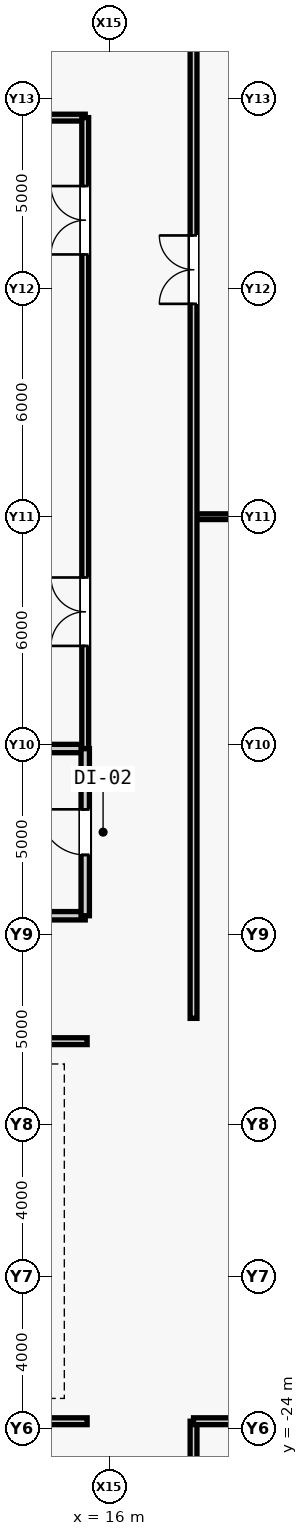
"""IFC4 building model, lengths in metres.
Left out: names, types, materials, properties, quantities, classifications, styles, units other than length and angle.
Written with IfcOpenShell. Run it as: python <this file> out.ifc"""

import sys

from ifc_helpers import new_model, si_unit, direction, frame, frame_2d, origin, place, context, subcontext, project, spatial, rectangle, extrude, source, transform, mapped, element, fill, save


model = new_model("IFC4")
c1 = context("Model", 3, precision=1e-05, world=origin(), true_north=direction((0.0, 1.0)))
c2 = subcontext(c1, "Body", "Model", "MODEL_VIEW")
j1 = project(units=[si_unit("LENGTHUNIT", "METRE"), si_unit("PLANEANGLEUNIT", "RADIAN")], contexts=[c1])
p1 = place(None, origin())
s1 = spatial("IfcSite", under=j1, at=p1, CompositionType="ELEMENT")
p2 = place(p1, origin())
s2 = spatial("IfcBuilding", under=s1, at=p2, CompositionType="ELEMENT")
p3 = place(p2, origin())
s3 = spatial("IfcBuildingStorey", under=s2, at=p3, CompositionType="ELEMENT", Elevation=0.0)
m1 = source(origin(), c2, "Body", "SweptSolid", [
    extrude(rectangle(XDim=4.05, YDim=0.22, at=frame_2d((2.025, 0.0))), origin(), (0.0, 0.0, 1.0), 6.28),
])
for number, where, z_axis, x_axis in (
    (1, (11.3, -10.5, 0.0), (0.0, 0.0, 1.0), (1.0, 0.0, 0.0)),
    (2, (11.3, -6.1, 0.0), (0.0, 0.0, 1.0), (1.0, 0.0, 0.0)),
):
    element("IfcWall", number, at=place(p3, frame(where, z_axis=z_axis, x_axis=x_axis)), inside=s3, PredefinedType="PARTITIONING", context=c2, shape_type="MappedRepresentation", body=[
        mapped(m1, transform((0.0, 0.0, 0.0), scale=1.0)),
    ])
m2 = source(origin(), c2, "Body", "SweptSolid", [
    extrude(rectangle(XDim=4.4, YDim=0.22, at=frame_2d((2.2, 0.0))), origin(), (0.0, 0.0, 1.0), 6.28),
])
p4 = place(p3, frame((15.35, -10.5, 0.0), z_axis=(0.0, 0.0, 1.0), x_axis=(0.0, 1.0, 0.0)))
e3 = element("IfcWall", 3, at=p4, inside=s3, PredefinedType="PARTITIONING", context=c2, shape_type="MappedRepresentation", body=[
    mapped(m2, transform((0.0, 0.0, 0.0), scale=1.0)),
])
m3 = source(origin(), c2, "Body", "SweptSolid", [
    extrude(rectangle(XDim=1.2, YDim=2.2, at=frame_2d((0.6, 1.1))), frame((0.0, 0.12, 0.0), z_axis=(0.0, -1.0, 0.0), x_axis=(1.0, 0.0, 0.0)), (0.0, 0.0, 1.0), 0.24),
])
p5 = place(p4, frame((1.6, 0.0, 0.0)))
e4 = element("IfcOpeningElement", 4, at=p5, cuts=e3, PredefinedType="OPENING", context=c2, shape_type="MappedRepresentation", body=[
    mapped(m3, transform((0.0, 0.0, 0.0), scale=1.0)),
])
m4 = source(origin(), c2, "Body", "SweptSolid", [
    extrude(rectangle(XDim=4.05, YDim=0.18, at=frame_2d((2.025, 0.0))), origin(), (0.0, 0.0, 1.0), 6.28),
])
p6 = place(p3, frame((11.3, 10.5, 0.0), z_axis=(0.0, 0.0, 1.0), x_axis=(1.0, 0.0, 0.0)))
e5 = element("IfcWall", 5, at=p6, inside=s3, PredefinedType="PARTITIONING", context=c2, shape_type="MappedRepresentation", body=[
    mapped(m4, transform((0.0, 0.0, 0.0), scale=1.0)),
])
m5 = source(origin(), c2, "Body", "SweptSolid", [
    extrude(rectangle(XDim=16.6, YDim=0.18, at=frame_2d((8.3, 0.0))), origin(), (0.0, 0.0, 1.0), 6.28),
])
p7 = place(p3, frame((15.35, -6.1, 0.0), z_axis=(0.0, 0.0, 1.0), x_axis=(0.0, 1.0, 0.0)))
e6 = element("IfcWall", 6, at=p7, inside=s3, PredefinedType="PARTITIONING", context=c2, shape_type="MappedRepresentation", body=[
    mapped(m5, transform((0.0, 0.0, 0.0), scale=1.0)),
])
m6 = source(origin(), c2, "Body", "SweptSolid", [
    extrude(rectangle(XDim=1.8, YDim=2.25, at=frame_2d((0.9, 1.125))), frame((0.0, 0.1, 0.0), z_axis=(0.0, -1.0, 0.0), x_axis=(1.0, 0.0, 0.0)), (0.0, 0.0, 1.0), 0.2),
])
p8 = place(p7, frame((2.7, 0.0, 0.0)))
e7 = element("IfcOpeningElement", 7, at=p8, cuts=e6, PredefinedType="OPENING", context=c2, shape_type="MappedRepresentation", body=[
    mapped(m6, transform((0.0, 0.0, 0.0), scale=1.0)),
])
p9 = place(p7, frame((13.0, 0.0, 0.0)))
e8 = element("IfcOpeningElement", 8, at=p9, cuts=e6, PredefinedType="OPENING", context=c2, shape_type="MappedRepresentation", body=[
    mapped(m6, transform((0.0, 0.0, 0.0), scale=1.0)),
])
m7 = source(origin(), c2, "Body", "SweptSolid", [
    extrude(rectangle(XDim=30.8, YDim=0.18, at=frame_2d((15.4, 0.0))), origin(), (0.0, 0.0, 1.0), 4.08),
])
p10 = place(p3, frame((-15.4, -23.8, 0.0), z_axis=(0.0, 0.0, 1.0), x_axis=(1.0, 0.0, 0.0)))
e9 = element("IfcWall", 9, at=p10, inside=s3, PredefinedType="PARTITIONING", context=c2, shape_type="MappedRepresentation", body=[
    mapped(m7, transform((0.0, 0.0, 0.0), scale=1.0)),
])
p11 = place(p10, frame((8.5, 0.0, 0.0)))
e10 = element("IfcOpeningElement", 10, at=p11, cuts=e9, PredefinedType="OPENING", context=c2, shape_type="MappedRepresentation", body=[
    mapped(m6, transform((0.0, 0.0, 0.0), scale=1.0)),
])
p12 = place(p10, frame((20.5, 0.0, 0.0)))
e11 = element("IfcOpeningElement", 11, at=p12, cuts=e9, PredefinedType="OPENING", context=c2, shape_type="MappedRepresentation", body=[
    mapped(m6, transform((0.0, 0.0, 0.0), scale=1.0)),
])
m8 = source(origin(), c2, "Body", "SweptSolid", [
    extrude(rectangle(XDim=1.8, YDim=1.4, at=frame_2d((0.9, 0.7))), frame((0.0, 0.1, 0.0), z_axis=(0.0, -1.0, 0.0), x_axis=(1.0, 0.0, 0.0)), (0.0, 0.0, 1.0), 0.2),
])
p13 = place(p10, frame((3.5, 0.0, 0.9)))
e12 = element("IfcOpeningElement", 12, at=p13, cuts=e9, PredefinedType="OPENING", context=c2, shape_type="MappedRepresentation", body=[
    mapped(m8, transform((0.0, 0.0, 0.0), scale=1.0)),
])
p14 = place(p10, frame((23.7, 0.0, 0.9)))
e13 = element("IfcOpeningElement", 13, at=p14, cuts=e9, PredefinedType="OPENING", context=c2, shape_type="MappedRepresentation", body=[
    mapped(m8, transform((0.0, 0.0, 0.0), scale=1.0)),
])
m9 = source(origin(), c2, "Body", "SweptSolid", [
    extrude(rectangle(XDim=30.8, YDim=0.18, at=frame_2d((15.4, 0.0))), origin(), (0.0, 0.0, 1.0), 6.28),
])
p15 = place(p3, frame((-15.4, -13.8, 0.0), z_axis=(0.0, 0.0, 1.0), x_axis=(1.0, 0.0, 0.0)))
e14 = element("IfcWall", 14, at=p15, inside=s3, PredefinedType="PARTITIONING", context=c2, shape_type="MappedRepresentation", body=[
    mapped(m9, transform((0.0, 0.0, 0.0), scale=1.0)),
])
p16 = place(p15, frame((14.5, 0.0, 0.0)))
e15 = element("IfcOpeningElement", 15, at=p16, cuts=e14, PredefinedType="OPENING", context=c2, shape_type="MappedRepresentation", body=[
    mapped(m6, transform((0.0, 0.0, 0.0), scale=1.0)),
])
m10 = source(origin(), c2, "Body", "SweptSolid", [
    extrude(rectangle(XDim=4.5, YDim=0.18, at=frame_2d((2.25, 0.0))), origin(), (0.0, 0.0, 1.0), 6.28),
])
p17 = place(p3, frame((18.2, -28.3, 0.0), z_axis=(0.0, 0.0, 1.0), x_axis=(0.0, 1.0, 0.0)))
e16 = element("IfcWall", 16, at=p17, inside=s3, PredefinedType="PARTITIONING", context=c2, shape_type="MappedRepresentation", body=[
    mapped(m10, transform((0.0, 0.0, 0.0), scale=1.0)),
])
p18 = place(p17, frame((1.4, 0.0, 0.0)))
e17 = element("IfcOpeningElement", 17, at=p18, cuts=e16, PredefinedType="OPENING", context=c2, shape_type="MappedRepresentation", body=[
    mapped(m6, transform((0.0, 0.0, 0.0), scale=1.0)),
])
m11 = source(origin(), c2, "Body", "SweptSolid", [
    extrude(rectangle(XDim=7.3, YDim=0.18, at=frame_2d((3.65, 0.0))), origin(), (0.0, 0.0, 1.0), 4.08),
])
p19 = place(p3, frame((18.2, -23.8, 0.0), z_axis=(0.0, 0.0, 1.0), x_axis=(1.0, 0.0, 0.0)))
e18 = element("IfcWall", 18, at=p19, inside=s3, PredefinedType="PARTITIONING", context=c2, shape_type="MappedRepresentation", body=[
    mapped(m11, transform((0.0, 0.0, 0.0), scale=1.0)),
])
p20 = place(p19, frame((1.1, 0.0, 0.0)))
e19 = element("IfcOpeningElement", 19, at=p20, cuts=e18, PredefinedType="OPENING", context=c2, shape_type="MappedRepresentation", body=[
    mapped(m6, transform((0.0, 0.0, 0.0), scale=1.0)),
])
m12 = source(origin(), c2, "Body", "SweptSolid", [
    extrude(rectangle(XDim=27.8, YDim=0.15, at=frame_2d((13.9, 0.0))), origin(), (0.0, 0.0, 1.0), 4.48),
])
p21 = place(p3, frame((18.2, 0.0, 0.0), z_axis=(0.0, 0.0, 1.0), x_axis=(1.0, 0.0, 0.0)))
e20 = element("IfcWall", 20, at=p21, inside=s3, PredefinedType="PARTITIONING", context=c2, shape_type="MappedRepresentation", body=[
    mapped(m12, transform((0.0, 0.0, 0.0), scale=1.0)),
])
m13 = source(origin(), c2, "Body", "SweptSolid", [
    extrude(rectangle(XDim=1.05, YDim=2.2, at=frame_2d((0.525, 1.1))), frame((0.0, 0.085, 0.0), z_axis=(0.0, -1.0, 0.0), x_axis=(1.0, 0.0, 0.0)), (0.0, 0.0, 1.0), 0.17),
])
p22 = place(p21, frame((17.275, 0.0, 0.0)))
e21 = element("IfcOpeningElement", 21, at=p22, cuts=e20, PredefinedType="OPENING", context=c2, shape_type="MappedRepresentation", body=[
    mapped(m13, transform((0.0, 0.0, 0.0), scale=1.0)),
])
m14 = source(origin(), c2, "Body", "SweptSolid", [
    extrude(rectangle(XDim=27.0, YDim=0.18, at=frame_2d((13.5, 0.0))), origin(), (0.0, 0.0, 1.0), 6.28),
])
p23 = place(p3, frame((18.2, -13.2, 0.0), z_axis=(0.0, 0.0, 1.0), x_axis=(0.0, 1.0, 0.0)))
e22 = element("IfcWall", 22, at=p23, inside=s3, PredefinedType="PARTITIONING", context=c2, shape_type="MappedRepresentation", body=[
    mapped(m14, transform((0.0, 0.0, 0.0), scale=1.0)),
])
p24 = place(p23, frame((18.8, 0.0, 0.0)))
e23 = element("IfcOpeningElement", 23, at=p24, cuts=e22, PredefinedType="OPENING", context=c2, shape_type="MappedRepresentation", body=[
    mapped(m6, transform((0.0, 0.0, 0.0), scale=1.0)),
])
m15 = source(origin(), c2, "Body", "SweptSolid", [
    extrude(rectangle(XDim=1.2, YDim=2.2, at=frame_2d((0.6, 1.1))), frame((0.0, 0.025, 0.0), z_axis=(0.0, -1.0, 0.0), x_axis=(1.0, 0.0, 0.0)), (0.0, 0.0, 1.0), 0.05),
])
p25 = place(p5, origin())
e24 = element("IfcDoor", 24, at=p25, inside=s3, OperationType="SINGLE_SWING_RIGHT", PredefinedType="DOOR", context=c2, shape_type="MappedRepresentation", body=[
    mapped(m15, transform((0.0, 0.0, 0.0), scale=1.0)),
])
fill(e4, e24)
m16 = source(origin(), c2, "Body", "SweptSolid", [
    extrude(rectangle(XDim=1.8, YDim=2.25, at=frame_2d((0.9, 1.125))), frame((0.0, 0.025, 0.0), z_axis=(0.0, -1.0, 0.0), x_axis=(1.0, 0.0, 0.0)), (0.0, 0.0, 1.0), 0.05),
])
p26 = place(p8, origin())
e25 = element("IfcDoor", 25, at=p26, inside=s3, OperationType="SINGLE_SWING_RIGHT", PredefinedType="DOOR", context=c2, shape_type="MappedRepresentation", body=[
    mapped(m16, transform((0.0, 0.0, 0.0), scale=1.0)),
])
fill(e7, e25)
p27 = place(p9, origin())
e26 = element("IfcDoor", 26, at=p27, inside=s3, OperationType="SINGLE_SWING_LEFT", PredefinedType="DOOR", context=c2, shape_type="MappedRepresentation", body=[
    mapped(m16, transform((0.0, 0.0, 0.0), scale=1.0)),
])
fill(e8, e26)
p28 = place(p24, origin())
e27 = element("IfcDoor", 27, at=p28, inside=s3, OperationType="SINGLE_SWING_RIGHT", PredefinedType="DOOR", context=c2, shape_type="MappedRepresentation", body=[
    mapped(m16, transform((0.0, 0.0, 0.0), scale=1.0)),
])
fill(e23, e27)
save(model, sys.argv[1])
